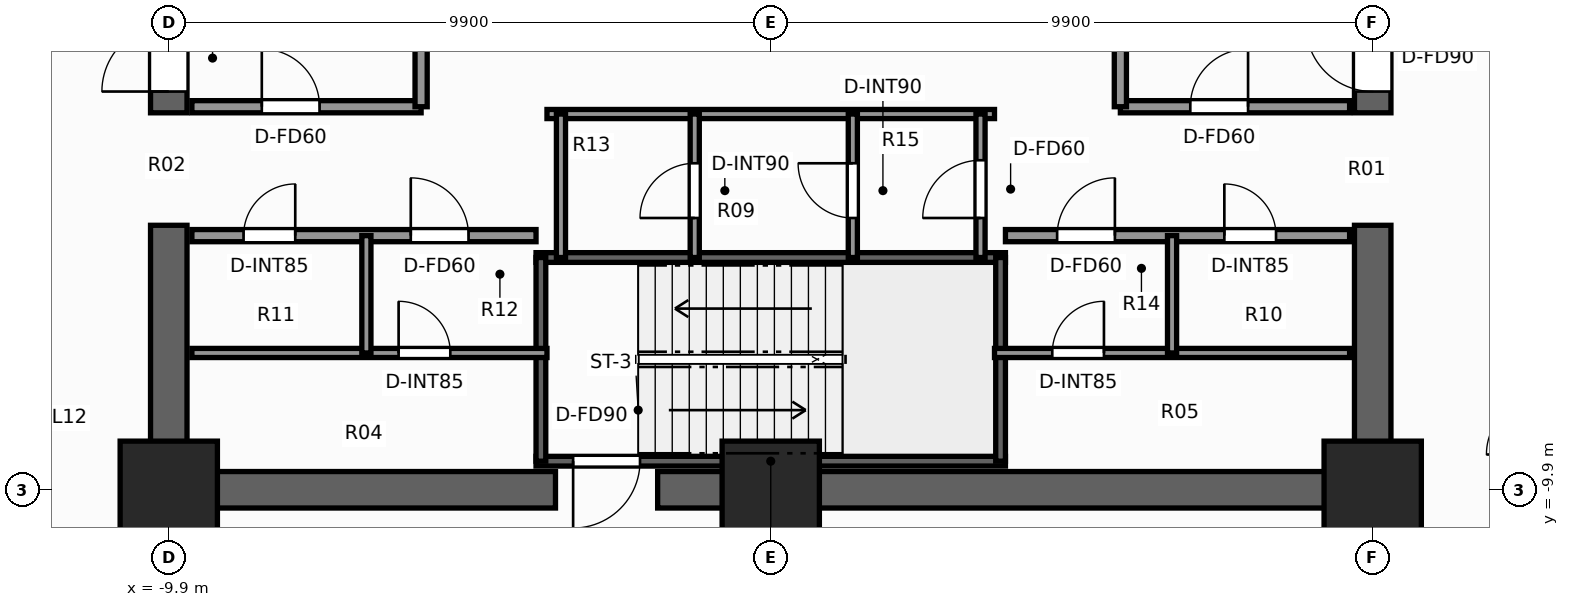
"""IFC4 building model, lengths in metres.
Left out: names, types, materials, properties, quantities, classifications, styles, units other than length and angle.
Written with IfcOpenShell. Run it as: python <this file> out.ifc"""

import sys

from ifc_helpers import new_model, si_unit, direction, frame, frame_2d, origin, origin_2d, place, context, subcontext, project, spatial, rectangle, extrude, element, fill, save


model = new_model("IFC4")
c1 = context("Model", 3, precision=1e-05, world=origin(), true_north=direction((0.0, 1.0)))
c2 = subcontext(c1, "Body", "Model", "MODEL_VIEW")
j1 = project(units=[si_unit("LENGTHUNIT", "METRE"), si_unit("PLANEANGLEUNIT", "RADIAN")], contexts=[c1])
p1 = place(None, origin())
s1 = spatial("IfcSite", under=j1, at=p1, CompositionType="ELEMENT")
p2 = place(p1, origin())
s2 = spatial("IfcBuilding", under=s1, at=p2, CompositionType="ELEMENT")
p3 = place(p2, frame((0.0, 0.0, 5.5)))
s3 = spatial("IfcBuildingStorey", under=s2, at=p3, CompositionType="ELEMENT", Elevation=5.5)
p4 = place(p3, frame((10.2, -9.9, 0.0), z_axis=(0.0, 0.0, 1.0), x_axis=(-1.0, 0.0, 0.0)))
e1 = element("IfcWall", 1, at=p4, inside=s3, PredefinedType="SHEAR", context=c2, shape_type="SweptSolid", body=[
    extrude(rectangle(XDim=12.06, YDim=0.6, at=frame_2d((6.03, 0.0))), origin(), (0.0, 0.0, 1.0), 4.5),
])
p5 = place(p3, frame((-3.54, -9.9, 0.0), z_axis=(0.0, 0.0, 1.0), x_axis=(-1.0, 0.0, 0.0)))
e2 = element("IfcWall", 2, at=p5, inside=s3, PredefinedType="SHEAR", context=c2, shape_type="SweptSolid", body=[
    extrude(rectangle(XDim=6.66, YDim=0.6, at=frame_2d((3.33, 0.0))), origin(), (0.0, 0.0, 1.0), 4.5),
])
for number, where, z_axis, x_axis in (
    (3, (-9.9, -9.6, 0.0), (0.0, 0.0, 1.0), (0.0, 1.0, 0.0)),
    (4, (9.9, -9.6, 0.0), (0.0, 0.0, 1.0), (0.0, 1.0, 0.0)),
):
    element("IfcWall", number, at=place(p3, frame(where, z_axis=z_axis, x_axis=x_axis)), inside=s3, PredefinedType="SHEAR", context=c2, shape_type="SweptSolid", body=[
        extrude(rectangle(XDim=4.05, YDim=0.6, at=frame_2d((2.025, 0.0))), origin(), (0.0, 0.0, 1.0), 4.5),
    ])
p6 = place(p3, frame((-9.9, -3.7, 0.0), z_axis=(0.0, 0.0, 1.0), x_axis=(0.0, 1.0, 0.0)))
e5 = element("IfcWall", 5, at=p6, inside=s3, PredefinedType="SHEAR", context=c2, shape_type="SweptSolid", body=[
    extrude(rectangle(XDim=13.3, YDim=0.6, at=frame_2d((6.65, 0.0))), origin(), (0.0, 0.0, 1.0), 4.5),
])
p7 = place(p6, frame((0.35, 0.0, 0.0)))
e6 = element("IfcOpeningElement", 6, at=p7, cuts=e5, PredefinedType="OPENING", context=c2, shape_type="SweptSolid", body=[
    extrude(rectangle(XDim=1.1, YDim=2.2, at=frame_2d((0.55, 1.1))), frame((0.0, 0.31, 0.0), z_axis=(0.0, -1.0, 0.0), x_axis=(1.0, 0.0, 0.0)), (0.0, 0.0, 1.0), 0.62),
])
p8 = place(p3, frame((9.9, -3.7, 0.0), z_axis=(0.0, 0.0, 1.0), x_axis=(0.0, 1.0, 0.0)))
e7 = element("IfcWall", 7, at=p8, inside=s3, PredefinedType="SHEAR", context=c2, shape_type="SweptSolid", body=[
    extrude(rectangle(XDim=13.3, YDim=0.6, at=frame_2d((6.65, 0.0))), origin(), (0.0, 0.0, 1.0), 4.5),
])
p9 = place(p8, frame((0.35, 0.0, 0.0)))
e8 = element("IfcOpeningElement", 8, at=p9, cuts=e7, PredefinedType="OPENING", context=c2, shape_type="SweptSolid", body=[
    extrude(rectangle(XDim=1.1, YDim=2.2, at=frame_2d((0.55, 1.1))), frame((0.0, 0.31, 0.0), z_axis=(0.0, -1.0, 0.0), x_axis=(1.0, 0.0, 0.0)), (0.0, 0.0, 1.0), 0.62),
])
for number, where, z_axis, x_axis in (
    (9, (-9.9, -9.9, 0.0), (0.0, 0.0, 1.0), (1.0, 0.0, 0.0)),
    (10, (9.9, -9.9, 0.0), (0.0, 0.0, 1.0), (1.0, 0.0, 0.0)),
    (11, (0.0, -9.9, 0.0), (0.0, 0.0, 1.0), (1.0, 0.0, 0.0)),
):
    element("IfcColumn", number, at=place(p3, frame(where, z_axis=z_axis, x_axis=x_axis)), inside=s3, PredefinedType="COLUMN", context=c2, shape_type="SweptSolid", body=[
        extrude(rectangle(XDim=1.6, YDim=1.6, at=origin_2d()), origin(), (0.0, 0.0, 1.0), 4.5),
    ])
p10 = place(p3, frame((3.86, -9.43, 0.0), z_axis=(0.0, 0.0, 1.0), x_axis=(-1.0, 0.0, 0.0)))
e12 = element("IfcWall", 12, at=p10, inside=s3, PredefinedType="SHEAR", context=c2, shape_type="SweptSolid", body=[
    extrude(rectangle(XDim=7.72, YDim=0.16, at=frame_2d((3.86, 0.0))), origin(), (0.0, 0.0, 1.0), 4.5),
])
p11 = place(p10, frame((6.01, 0.0, 0.0)))
e13 = element("IfcOpeningElement", 13, at=p11, cuts=e12, PredefinedType="OPENING", context=c2, shape_type="SweptSolid", body=[
    extrude(rectangle(XDim=1.1, YDim=2.2, at=frame_2d((0.55, 1.1))), frame((0.0, 0.09, 0.0), z_axis=(0.0, -1.0, 0.0), x_axis=(1.0, 0.0, 0.0)), (0.0, 0.0, 1.0), 0.18),
])
p12 = place(p3, frame((-3.86, -6.08, 0.0), z_axis=(0.0, 0.0, 1.0), x_axis=(1.0, 0.0, 0.0)))
e14 = element("IfcWall", 14, at=p12, inside=s3, PredefinedType="SHEAR", context=c2, shape_type="SweptSolid", body=[
    extrude(rectangle(XDim=7.72, YDim=0.16, at=frame_2d((3.86, 0.0))), origin(), (0.0, 0.0, 1.0), 4.5),
])
for number, where, z_axis, x_axis in (
    (15, (-3.78, -9.43, 0.0), (0.0, 0.0, 1.0), (0.0, 1.0, 0.0)),
    (16, (3.78, -9.43, 0.0), (0.0, 0.0, 1.0), (0.0, 1.0, 0.0)),
):
    element("IfcWall", number, at=place(p3, frame(where, z_axis=z_axis, x_axis=x_axis)), inside=s3, PredefinedType="SHEAR", context=c2, shape_type="SweptSolid", body=[
        extrude(rectangle(XDim=3.35, YDim=0.16, at=frame_2d((1.675, 0.0))), origin(), (0.0, 0.0, 1.0), 4.5),
    ])
p13 = place(p3, frame((-9.52, -3.6, 0.0), z_axis=(0.0, 0.0, 1.0), x_axis=(1.0, 0.0, 0.0)))
e17 = element("IfcWall", 17, at=p13, inside=s3, PredefinedType="SOLIDWALL", context=c2, shape_type="SweptSolid", body=[
    extrude(rectangle(XDim=3.77, YDim=0.2, at=frame_2d((1.885, 0.0))), origin(), (0.0, 0.0, 1.0), 4.22),
])
p14 = place(p13, frame((1.15, 0.0, 0.0)))
e18 = element("IfcOpeningElement", 18, at=p14, cuts=e17, PredefinedType="OPENING", context=c2, shape_type="SweptSolid", body=[
    extrude(rectangle(XDim=0.95, YDim=2.06, at=frame_2d((0.475, 1.03))), frame((0.0, 0.11, 0.0), z_axis=(0.0, -1.0, 0.0), x_axis=(1.0, 0.0, 0.0)), (0.0, 0.0, 1.0), 0.22),
])
p15 = place(p3, frame((-5.75, -3.6, 0.0), z_axis=(0.0, 0.0, 1.0), x_axis=(0.0, 1.0, 0.0)))
e19 = element("IfcWall", 19, at=p15, inside=s3, PredefinedType="SOLIDWALL", context=c2, shape_type="SweptSolid", body=[
    extrude(rectangle(XDim=5.57, YDim=0.2, at=frame_2d((2.785, 0.0))), origin(), (0.0, 0.0, 1.0), 4.22),
])
p16 = place(p15, frame((2.75, 0.0, 0.0)))
e20 = element("IfcOpeningElement", 20, at=p16, cuts=e19, PredefinedType="OPENING", context=c2, shape_type="SweptSolid", body=[
    extrude(rectangle(XDim=1.1, YDim=2.2, at=frame_2d((0.55, 1.1))), frame((0.0, 0.11, 0.0), z_axis=(0.0, -1.0, 0.0), x_axis=(1.0, 0.0, 0.0)), (0.0, 0.0, 1.0), 0.22),
])
p17 = place(p3, frame((5.75, -3.6, 0.0), z_axis=(0.0, 0.0, 1.0), x_axis=(1.0, 0.0, 0.0)))
e21 = element("IfcWall", 21, at=p17, inside=s3, PredefinedType="SOLIDWALL", context=c2, shape_type="SweptSolid", body=[
    extrude(rectangle(XDim=3.77, YDim=0.2, at=frame_2d((1.885, 0.0))), origin(), (0.0, 0.0, 1.0), 4.22),
])
p18 = place(p17, frame((1.15, 0.0, 0.0)))
e22 = element("IfcOpeningElement", 22, at=p18, cuts=e21, PredefinedType="OPENING", context=c2, shape_type="SweptSolid", body=[
    extrude(rectangle(XDim=0.95, YDim=2.06, at=frame_2d((0.475, 1.03))), frame((0.0, 0.11, 0.0), z_axis=(0.0, -1.0, 0.0), x_axis=(1.0, 0.0, 0.0)), (0.0, 0.0, 1.0), 0.22),
])
p19 = place(p3, frame((5.75, -3.6, 0.0), z_axis=(0.0, 0.0, 1.0), x_axis=(0.0, 1.0, 0.0)))
e23 = element("IfcWall", 23, at=p19, inside=s3, PredefinedType="SOLIDWALL", context=c2, shape_type="SweptSolid", body=[
    extrude(rectangle(XDim=5.57, YDim=0.2, at=frame_2d((2.785, 0.0))), origin(), (0.0, 0.0, 1.0), 4.22),
])
p20 = place(p19, frame((2.75, 0.0, 0.0)))
e24 = element("IfcOpeningElement", 24, at=p20, cuts=e23, PredefinedType="OPENING", context=c2, shape_type="SweptSolid", body=[
    extrude(rectangle(XDim=1.1, YDim=2.2, at=frame_2d((0.55, 1.1))), frame((0.0, 0.11, 0.0), z_axis=(0.0, -1.0, 0.0), x_axis=(1.0, 0.0, 0.0)), (0.0, 0.0, 1.0), 0.22),
])
p21 = place(p3, frame((-9.52, -5.72, 0.0), z_axis=(0.0, 0.0, 1.0), x_axis=(1.0, 0.0, 0.0)))
e25 = element("IfcWall", 25, at=p21, inside=s3, PredefinedType="SOLIDWALL", context=c2, shape_type="SweptSolid", body=[
    extrude(rectangle(XDim=5.66, YDim=0.2, at=frame_2d((2.83, 0.0))), origin(), (0.0, 0.0, 1.0), 4.22),
])
p22 = place(p21, frame((3.6, 0.0, 0.0)))
e26 = element("IfcOpeningElement", 26, at=p22, cuts=e25, PredefinedType="OPENING", context=c2, shape_type="SweptSolid", body=[
    extrude(rectangle(XDim=0.95, YDim=2.06, at=frame_2d((0.475, 1.03))), frame((0.0, 0.11, 0.0), z_axis=(0.0, -1.0, 0.0), x_axis=(1.0, 0.0, 0.0)), (0.0, 0.0, 1.0), 0.22),
])
p23 = place(p21, frame((0.85, 0.0, 0.0)))
e27 = element("IfcOpeningElement", 27, at=p23, cuts=e25, PredefinedType="OPENING", context=c2, shape_type="SweptSolid", body=[
    extrude(rectangle(XDim=0.85, YDim=2.03, at=frame_2d((0.425, 1.015))), frame((0.0, 0.11, 0.0), z_axis=(0.0, -1.0, 0.0), x_axis=(1.0, 0.0, 0.0)), (0.0, 0.0, 1.0), 0.22),
])
p24 = place(p3, frame((-9.52, -7.65, 0.0), z_axis=(0.0, 0.0, 1.0), x_axis=(1.0, 0.0, 0.0)))
e28 = element("IfcWall", 28, at=p24, inside=s3, PredefinedType="PARTITIONING", context=c2, shape_type="SweptSolid", body=[
    extrude(rectangle(XDim=5.84, YDim=0.15, at=frame_2d((2.92, 0.0))), origin(), (0.0, 0.0, 1.0), 4.22),
])
p25 = place(p24, frame((3.4, 0.0, 0.0)))
e29 = element("IfcOpeningElement", 29, at=p25, cuts=e28, PredefinedType="OPENING", context=c2, shape_type="SweptSolid", body=[
    extrude(rectangle(XDim=0.85, YDim=2.03, at=frame_2d((0.425, 1.015))), frame((0.0, 0.085, 0.0), z_axis=(0.0, -1.0, 0.0), x_axis=(1.0, 0.0, 0.0)), (0.0, 0.0, 1.0), 0.17),
])
p26 = place(p3, frame((-6.65, -7.65, 0.0), z_axis=(0.0, 0.0, 1.0), x_axis=(0.0, 1.0, 0.0)))
e30 = element("IfcWall", 30, at=p26, inside=s3, PredefinedType="PARTITIONING", context=c2, shape_type="SweptSolid", body=[
    extrude(rectangle(XDim=1.93, YDim=0.15, at=frame_2d((0.965, 0.0))), origin(), (0.0, 0.0, 1.0), 4.22),
])
p27 = place(p3, frame((3.86, -5.72, 0.0), z_axis=(0.0, 0.0, 1.0), x_axis=(1.0, 0.0, 0.0)))
e31 = element("IfcWall", 31, at=p27, inside=s3, PredefinedType="SOLIDWALL", context=c2, shape_type="SweptSolid", body=[
    extrude(rectangle(XDim=5.66, YDim=0.2, at=frame_2d((2.83, 0.0))), origin(), (0.0, 0.0, 1.0), 4.22),
])
p28 = place(p27, frame((0.85, 0.0, 0.0)))
e32 = element("IfcOpeningElement", 32, at=p28, cuts=e31, PredefinedType="OPENING", context=c2, shape_type="SweptSolid", body=[
    extrude(rectangle(XDim=0.95, YDim=2.06, at=frame_2d((0.475, 1.03))), frame((0.0, 0.11, 0.0), z_axis=(0.0, -1.0, 0.0), x_axis=(1.0, 0.0, 0.0)), (0.0, 0.0, 1.0), 0.22),
])
p29 = place(p27, frame((3.6, 0.0, 0.0)))
e33 = element("IfcOpeningElement", 33, at=p29, cuts=e31, PredefinedType="OPENING", context=c2, shape_type="SweptSolid", body=[
    extrude(rectangle(XDim=0.85, YDim=2.03, at=frame_2d((0.425, 1.015))), frame((0.0, 0.11, 0.0), z_axis=(0.0, -1.0, 0.0), x_axis=(1.0, 0.0, 0.0)), (0.0, 0.0, 1.0), 0.22),
])
p30 = place(p3, frame((3.68, -7.65, 0.0), z_axis=(0.0, 0.0, 1.0), x_axis=(1.0, 0.0, 0.0)))
e34 = element("IfcWall", 34, at=p30, inside=s3, PredefinedType="PARTITIONING", context=c2, shape_type="SweptSolid", body=[
    extrude(rectangle(XDim=5.84, YDim=0.15, at=frame_2d((2.92, 0.0))), origin(), (0.0, 0.0, 1.0), 4.22),
])
p31 = place(p30, frame((0.95, 0.0, 0.0)))
e35 = element("IfcOpeningElement", 35, at=p31, cuts=e34, PredefinedType="OPENING", context=c2, shape_type="SweptSolid", body=[
    extrude(rectangle(XDim=0.85, YDim=2.03, at=frame_2d((0.425, 1.015))), frame((0.0, 0.085, 0.0), z_axis=(0.0, -1.0, 0.0), x_axis=(1.0, 0.0, 0.0)), (0.0, 0.0, 1.0), 0.17),
])
p32 = place(p3, frame((6.6, -7.65, 0.0), z_axis=(0.0, 0.0, 1.0), x_axis=(0.0, 1.0, 0.0)))
e36 = element("IfcWall", 36, at=p32, inside=s3, PredefinedType="PARTITIONING", context=c2, shape_type="SweptSolid", body=[
    extrude(rectangle(XDim=1.93, YDim=0.15, at=frame_2d((0.965, 0.0))), origin(), (0.0, 0.0, 1.0), 4.22),
])
p33 = place(p3, frame((-3.68, -3.72, 0.0), z_axis=(0.0, 0.0, 1.0), x_axis=(1.0, 0.0, 0.0)))
e37 = element("IfcWall", 37, at=p33, inside=s3, PredefinedType="PARTITIONING", context=c2, shape_type="SweptSolid", body=[
    extrude(rectangle(XDim=7.36, YDim=0.15, at=frame_2d((3.68, 0.0))), origin(), (0.0, 0.0, 1.0), 4.22),
])
p34 = place(p3, frame((3.45, -6.08, 0.0), z_axis=(0.0, 0.0, 1.0), x_axis=(0.0, 1.0, 0.0)))
e38 = element("IfcWall", 38, at=p34, inside=s3, PredefinedType="PARTITIONING", context=c2, shape_type="SweptSolid", body=[
    extrude(rectangle(XDim=2.36, YDim=0.15, at=frame_2d((1.18, 0.0))), origin(), (0.0, 0.0, 1.0), 4.22),
])
p35 = place(p34, frame((0.65, 0.0, 0.0)))
e39 = element("IfcOpeningElement", 39, at=p35, cuts=e38, PredefinedType="OPENING", context=c2, shape_type="SweptSolid", body=[
    extrude(rectangle(XDim=0.95, YDim=2.06, at=frame_2d((0.475, 1.03))), frame((0.0, 0.085, 0.0), z_axis=(0.0, -1.0, 0.0), x_axis=(1.0, 0.0, 0.0)), (0.0, 0.0, 1.0), 0.17),
])
p36 = place(p3, frame((-3.45, -6.08, 0.0), z_axis=(0.0, 0.0, 1.0), x_axis=(0.0, 1.0, 0.0)))
e40 = element("IfcWall", 40, at=p36, inside=s3, PredefinedType="PARTITIONING", context=c2, shape_type="SweptSolid", body=[
    extrude(rectangle(XDim=2.36, YDim=0.15, at=frame_2d((1.18, 0.0))), origin(), (0.0, 0.0, 1.0), 4.22),
])
p37 = place(p3, frame((1.35, -6.08, 0.0), z_axis=(0.0, 0.0, 1.0), x_axis=(0.0, 1.0, 0.0)))
e41 = element("IfcWall", 41, at=p37, inside=s3, PredefinedType="PARTITIONING", context=c2, shape_type="SweptSolid", body=[
    extrude(rectangle(XDim=2.36, YDim=0.15, at=frame_2d((1.18, 0.0))), origin(), (0.0, 0.0, 1.0), 4.22),
])
p38 = place(p37, frame((0.65, 0.0, 0.0)))
e42 = element("IfcOpeningElement", 42, at=p38, cuts=e41, PredefinedType="OPENING", context=c2, shape_type="SweptSolid", body=[
    extrude(rectangle(XDim=0.9, YDim=2.06, at=frame_2d((0.45, 1.03))), frame((0.0, 0.085, 0.0), z_axis=(0.0, -1.0, 0.0), x_axis=(1.0, 0.0, 0.0)), (0.0, 0.0, 1.0), 0.17),
])
p39 = place(p3, frame((-1.25, -6.08, 0.0), z_axis=(0.0, 0.0, 1.0), x_axis=(0.0, 1.0, 0.0)))
e43 = element("IfcWall", 43, at=p39, inside=s3, PredefinedType="PARTITIONING", context=c2, shape_type="SweptSolid", body=[
    extrude(rectangle(XDim=2.36, YDim=0.15, at=frame_2d((1.18, 0.0))), origin(), (0.0, 0.0, 1.0), 4.22),
])
p40 = place(p39, frame((0.65, 0.0, 0.0)))
e44 = element("IfcOpeningElement", 44, at=p40, cuts=e43, PredefinedType="OPENING", context=c2, shape_type="SweptSolid", body=[
    extrude(rectangle(XDim=0.9, YDim=2.06, at=frame_2d((0.45, 1.03))), frame((0.0, 0.085, 0.0), z_axis=(0.0, -1.0, 0.0), x_axis=(1.0, 0.0, 0.0)), (0.0, 0.0, 1.0), 0.17),
])
p41 = place(p11, origin())
e45 = element("IfcDoor", 45, at=p41, inside=s3, OperationType="SINGLE_SWING_RIGHT", PredefinedType="DOOR", context=c2, shape_type="SweptSolid", body=[
    extrude(rectangle(XDim=1.1, YDim=2.2, at=frame_2d((0.55, 1.1))), frame((0.0, 0.025, 0.0), z_axis=(0.0, -1.0, 0.0), x_axis=(1.0, 0.0, 0.0)), (0.0, 0.0, 1.0), 0.05),
])
fill(e13, e45)
p42 = place(p7, origin())
e46 = element("IfcDoor", 46, at=p42, inside=s3, OperationType="SINGLE_SWING_LEFT", PredefinedType="DOOR", context=c2, shape_type="SweptSolid", body=[
    extrude(rectangle(XDim=1.1, YDim=2.2, at=frame_2d((0.55, 1.1))), frame((0.0, 0.025, 0.0), z_axis=(0.0, -1.0, 0.0), x_axis=(1.0, 0.0, 0.0)), (0.0, 0.0, 1.0), 0.05),
])
fill(e6, e46)
p43 = place(p9, origin())
e47 = element("IfcDoor", 47, at=p43, inside=s3, OperationType="SINGLE_SWING_RIGHT", PredefinedType="DOOR", context=c2, shape_type="SweptSolid", body=[
    extrude(rectangle(XDim=1.1, YDim=2.2, at=frame_2d((0.55, 1.1))), frame((0.0, 0.025, 0.0), z_axis=(0.0, -1.0, 0.0), x_axis=(1.0, 0.0, 0.0)), (0.0, 0.0, 1.0), 0.05),
])
fill(e8, e47)
p44 = place(p22, origin())
e48 = element("IfcDoor", 48, at=p44, inside=s3, OperationType="SINGLE_SWING_LEFT", PredefinedType="DOOR", context=c2, shape_type="SweptSolid", body=[
    extrude(rectangle(XDim=0.95, YDim=2.06, at=frame_2d((0.475, 1.03))), frame((0.0, 0.025, 0.0), z_axis=(0.0, -1.0, 0.0), x_axis=(1.0, 0.0, 0.0)), (0.0, 0.0, 1.0), 0.05),
])
fill(e26, e48)
p45 = place(p23, origin())
e49 = element("IfcDoor", 49, at=p45, inside=s3, OperationType="SINGLE_SWING_RIGHT", PredefinedType="DOOR", context=c2, shape_type="SweptSolid", body=[
    extrude(rectangle(XDim=0.85, YDim=2.03, at=frame_2d((0.425, 1.015))), frame((0.0, 0.025, 0.0), z_axis=(0.0, -1.0, 0.0), x_axis=(1.0, 0.0, 0.0)), (0.0, 0.0, 1.0), 0.05),
])
fill(e27, e49)
p46 = place(p25, origin())
e50 = element("IfcDoor", 50, at=p46, inside=s3, OperationType="SINGLE_SWING_LEFT", PredefinedType="DOOR", context=c2, shape_type="SweptSolid", body=[
    extrude(rectangle(XDim=0.85, YDim=2.03, at=frame_2d((0.425, 1.015))), frame((0.0, 0.025, 0.0), z_axis=(0.0, -1.0, 0.0), x_axis=(1.0, 0.0, 0.0)), (0.0, 0.0, 1.0), 0.05),
])
fill(e29, e50)
p47 = place(p14, origin())
e51 = element("IfcDoor", 51, at=p47, inside=s3, OperationType="SINGLE_SWING_LEFT", PredefinedType="DOOR", context=c2, shape_type="SweptSolid", body=[
    extrude(rectangle(XDim=0.95, YDim=2.06, at=frame_2d((0.475, 1.03))), frame((0.0, 0.025, 0.0), z_axis=(0.0, -1.0, 0.0), x_axis=(1.0, 0.0, 0.0)), (0.0, 0.0, 1.0), 0.05),
])
fill(e18, e51)
p48 = place(p28, origin())
e52 = element("IfcDoor", 52, at=p48, inside=s3, OperationType="SINGLE_SWING_RIGHT", PredefinedType="DOOR", context=c2, shape_type="SweptSolid", body=[
    extrude(rectangle(XDim=0.95, YDim=2.06, at=frame_2d((0.475, 1.03))), frame((0.0, 0.025, 0.0), z_axis=(0.0, -1.0, 0.0), x_axis=(1.0, 0.0, 0.0)), (0.0, 0.0, 1.0), 0.05),
])
fill(e32, e52)
p49 = place(p29, origin())
e53 = element("IfcDoor", 53, at=p49, inside=s3, OperationType="SINGLE_SWING_LEFT", PredefinedType="DOOR", context=c2, shape_type="SweptSolid", body=[
    extrude(rectangle(XDim=0.85, YDim=2.03, at=frame_2d((0.425, 1.015))), frame((0.0, 0.025, 0.0), z_axis=(0.0, -1.0, 0.0), x_axis=(1.0, 0.0, 0.0)), (0.0, 0.0, 1.0), 0.05),
])
fill(e33, e53)
p50 = place(p31, origin())
e54 = element("IfcDoor", 54, at=p50, inside=s3, OperationType="SINGLE_SWING_RIGHT", PredefinedType="DOOR", context=c2, shape_type="SweptSolid", body=[
    extrude(rectangle(XDim=0.85, YDim=2.03, at=frame_2d((0.425, 1.015))), frame((0.0, 0.025, 0.0), z_axis=(0.0, -1.0, 0.0), x_axis=(1.0, 0.0, 0.0)), (0.0, 0.0, 1.0), 0.05),
])
fill(e35, e54)
p51 = place(p18, origin())
e55 = element("IfcDoor", 55, at=p51, inside=s3, OperationType="SINGLE_SWING_RIGHT", PredefinedType="DOOR", context=c2, shape_type="SweptSolid", body=[
    extrude(rectangle(XDim=0.95, YDim=2.06, at=frame_2d((0.475, 1.03))), frame((0.0, 0.025, 0.0), z_axis=(0.0, -1.0, 0.0), x_axis=(1.0, 0.0, 0.0)), (0.0, 0.0, 1.0), 0.05),
])
fill(e22, e55)
p52 = place(p35, origin())
e56 = element("IfcDoor", 56, at=p52, inside=s3, OperationType="SINGLE_SWING_LEFT", PredefinedType="DOOR", context=c2, shape_type="SweptSolid", body=[
    extrude(rectangle(XDim=0.95, YDim=2.06, at=frame_2d((0.475, 1.03))), frame((0.0, 0.025, 0.0), z_axis=(0.0, -1.0, 0.0), x_axis=(1.0, 0.0, 0.0)), (0.0, 0.0, 1.0), 0.05),
])
fill(e39, e56)
p53 = place(p38, origin())
e57 = element("IfcDoor", 57, at=p53, inside=s3, OperationType="SINGLE_SWING_RIGHT", PredefinedType="DOOR", context=c2, shape_type="SweptSolid", body=[
    extrude(rectangle(XDim=0.9, YDim=2.06, at=frame_2d((0.45, 1.03))), frame((0.0, 0.025, 0.0), z_axis=(0.0, -1.0, 0.0), x_axis=(1.0, 0.0, 0.0)), (0.0, 0.0, 1.0), 0.05),
])
fill(e42, e57)
p54 = place(p40, origin())
e58 = element("IfcDoor", 58, at=p54, inside=s3, OperationType="SINGLE_SWING_LEFT", PredefinedType="DOOR", context=c2, shape_type="SweptSolid", body=[
    extrude(rectangle(XDim=0.9, YDim=2.06, at=frame_2d((0.45, 1.03))), frame((0.0, 0.025, 0.0), z_axis=(0.0, -1.0, 0.0), x_axis=(1.0, 0.0, 0.0)), (0.0, 0.0, 1.0), 0.05),
])
fill(e44, e58)
save(model, sys.argv[1])
